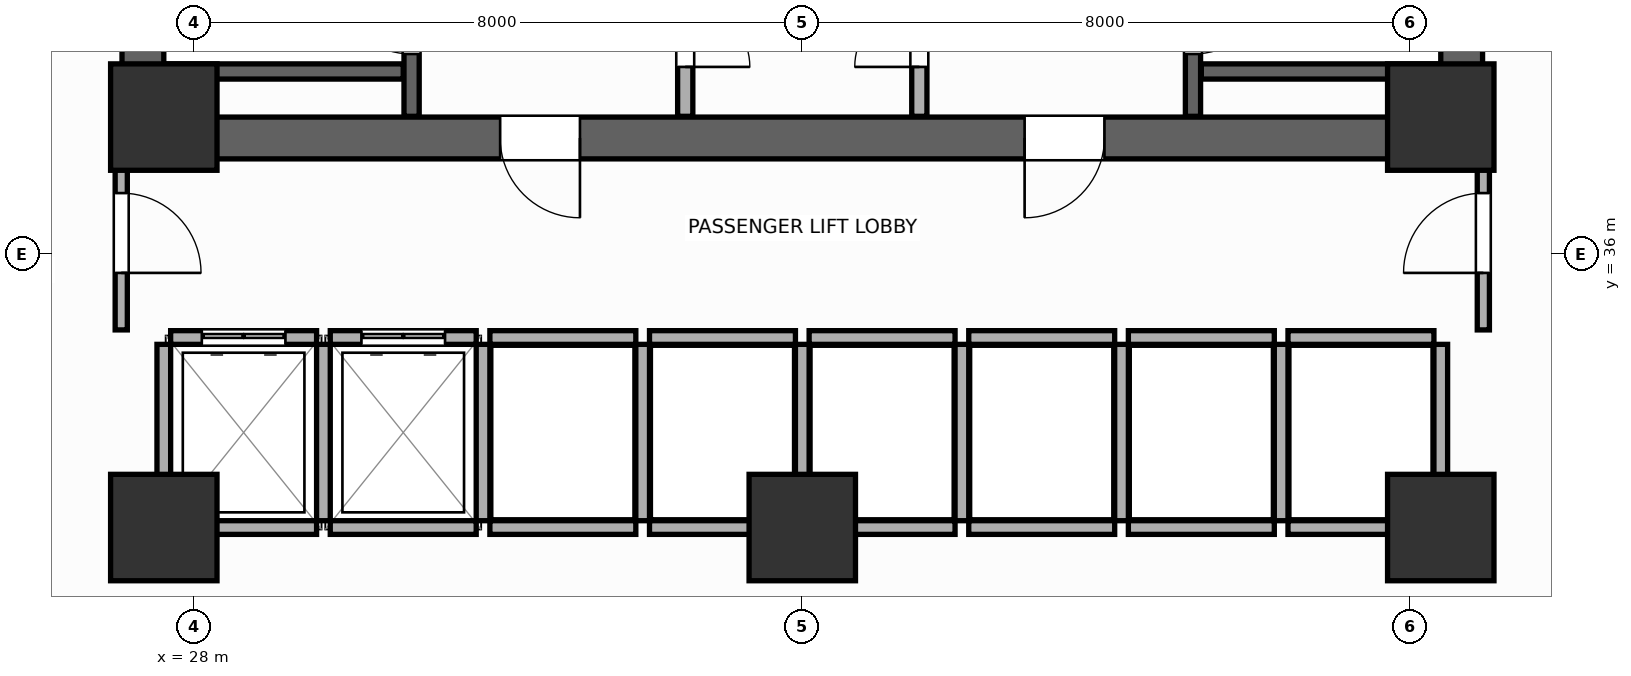
"""IFC4 building model, lengths in metres.
Left out: names, types, materials, properties, quantities, classifications, styles, units other than length and angle.
Written with IfcOpenShell. Run it as: python <this file> out.ifc"""

import sys

from ifc_helpers import new_model, si_unit, direction, frame, frame_2d, origin, origin_2d, place, context, subcontext, project, spatial, rectangle, extrude, source, transform, mapped, element, fill, save


model = new_model("IFC4")
c1 = context("Model", 3, precision=1e-05, world=origin(), true_north=direction((0.0, 1.0)))
c2 = subcontext(c1, "Body", "Model", "MODEL_VIEW")
j1 = project(units=[si_unit("LENGTHUNIT", "METRE"), si_unit("PLANEANGLEUNIT", "RADIAN")], contexts=[c1])
p1 = place(None, origin())
s1 = spatial("IfcSite", under=j1, at=p1, CompositionType="ELEMENT")
p2 = place(p1, origin())
s2 = spatial("IfcBuilding", under=s1, at=p2, CompositionType="ELEMENT")
p3 = place(p2, frame((0.0, 0.0, 75.6)))
s3 = spatial("IfcBuildingStorey", under=s2, at=p3, CompositionType="ELEMENT", Elevation=75.6)
p4 = place(p3, frame((27.05, 37.525, 0.0), z_axis=(0.0, 0.0, 1.0), x_axis=(1.0, 0.0, 0.0)))
e1 = element("IfcWall", 1, at=p4, inside=s3, PredefinedType="SHEAR", context=c2, shape_type="SweptSolid", body=[
    extrude(rectangle(XDim=17.9, YDim=0.55, at=frame_2d((8.95, 0.0))), origin(), (0.0, 0.0, 1.0), 3.9),
])
p5 = place(p4, frame((4.975, 0.0, 0.0)))
e2 = element("IfcOpeningElement", 2, at=p5, cuts=e1, PredefinedType="OPENING", context=c2, shape_type="SweptSolid", body=[
    extrude(rectangle(XDim=1.05, YDim=2.1, at=frame_2d((0.525, 1.05))), frame((0.0, 0.285, 0.0), z_axis=(0.0, -1.0, 0.0), x_axis=(1.0, 0.0, 0.0)), (0.0, 0.0, 1.0), 0.57),
])
p6 = place(p4, frame((11.875, 0.0, 0.0)))
e3 = element("IfcOpeningElement", 3, at=p6, cuts=e1, PredefinedType="OPENING", context=c2, shape_type="SweptSolid", body=[
    extrude(rectangle(XDim=1.05, YDim=2.1, at=frame_2d((0.525, 1.05))), frame((0.0, 0.285, 0.0), z_axis=(0.0, -1.0, 0.0), x_axis=(1.0, 0.0, 0.0)), (0.0, 0.0, 1.0), 0.57),
])
for number, where, z_axis, x_axis in (
    (4, (27.325, 37.8, 0.0), (0.0, 0.0, 1.0), (0.0, 1.0, 0.0)),
    (5, (44.675, 37.8, 0.0), (0.0, 0.0, 1.0), (0.0, 1.0, 0.0)),
):
    element("IfcWall", number, at=place(p3, frame(where, z_axis=z_axis, x_axis=x_axis)), inside=s3, PredefinedType="SHEAR", context=c2, shape_type="SweptSolid", body=[
        extrude(rectangle(XDim=9.0, YDim=0.55, at=frame_2d((4.5, 0.0))), origin(), (0.0, 0.0, 1.0), 3.9),
    ])
m1 = source(origin(), c2, "Body", "SweptSolid", [
    extrude(rectangle(XDim=1.4, YDim=1.4, at=origin_2d()), origin(), (0.0, 0.0, 1.0), 3.9),
])
for number, where, z_axis, x_axis in (
    (6, (27.6, 37.8, 0.0), (0.0, 0.0, 1.0), (1.0, 0.0, 0.0)),
    (7, (44.4, 37.8, 0.0), (0.0, 0.0, 1.0), (1.0, 0.0, 0.0)),
    (8, (27.6, 32.4, 0.0), (0.0, 0.0, 1.0), (1.0, 0.0, 0.0)),
    (9, (44.4, 32.4, 0.0), (0.0, 0.0, 1.0), (1.0, 0.0, 0.0)),
    (10, (36.0, 32.4, 0.0), (0.0, 0.0, 1.0), (1.0, 0.0, 0.0)),
):
    element("IfcColumn", number, at=place(p3, frame(where, z_axis=z_axis, x_axis=x_axis)), inside=s3, PredefinedType="COLUMN", context=c2, shape_type="MappedRepresentation", body=[
        mapped(m1, transform((0.0, 0.0, 0.0), scale=1.0)),
    ])
p7 = place(p3, frame((30.86, 37.81, 0.0), z_axis=(0.0, 0.0, 1.0), x_axis=(0.0, 1.0, 0.0)))
e11 = element("IfcWall", 11, at=p7, inside=s3, PredefinedType="SHEAR", context=c2, shape_type="SweptSolid", body=[
    extrude(rectangle(XDim=8.98, YDim=0.2, at=frame_2d((4.49, 0.0))), origin(), (0.0, 0.0, 1.0), 3.9),
])
p8 = place(p7, frame((0.82, 0.0, 0.0)))
e12 = element("IfcOpeningElement", 12, at=p8, cuts=e11, PredefinedType="OPENING", context=c2, shape_type="SweptSolid", body=[
    extrude(rectangle(XDim=1.05, YDim=2.1, at=frame_2d((0.525, 1.05))), frame((0.0, 0.11, 0.0), z_axis=(0.0, -1.0, 0.0), x_axis=(1.0, 0.0, 0.0)), (0.0, 0.0, 1.0), 0.22),
])
p9 = place(p3, frame((27.61, 38.4, 0.0), z_axis=(0.0, 0.0, 1.0), x_axis=(1.0, 0.0, 0.0)))
e13 = element("IfcWall", 13, at=p9, inside=s3, PredefinedType="SHEAR", context=c2, shape_type="SweptSolid", body=[
    extrude(rectangle(XDim=3.14, YDim=0.2, at=frame_2d((1.57, 0.0))), origin(), (0.0, 0.0, 1.0), 3.9),
])
p10 = place(p3, frame((41.14, 37.81, 0.0), z_axis=(0.0, 0.0, 1.0), x_axis=(0.0, 1.0, 0.0)))
e14 = element("IfcWall", 14, at=p10, inside=s3, PredefinedType="SHEAR", context=c2, shape_type="SweptSolid", body=[
    extrude(rectangle(XDim=8.98, YDim=0.2, at=frame_2d((4.49, 0.0))), origin(), (0.0, 0.0, 1.0), 3.9),
])
p11 = place(p10, frame((0.82, 0.0, 0.0)))
e15 = element("IfcOpeningElement", 15, at=p11, cuts=e14, PredefinedType="OPENING", context=c2, shape_type="SweptSolid", body=[
    extrude(rectangle(XDim=1.05, YDim=2.1, at=frame_2d((0.525, 1.05))), frame((0.0, 0.11, 0.0), z_axis=(0.0, -1.0, 0.0), x_axis=(1.0, 0.0, 0.0)), (0.0, 0.0, 1.0), 0.22),
])
p12 = place(p3, frame((41.25, 38.4, 0.0), z_axis=(0.0, 0.0, 1.0), x_axis=(1.0, 0.0, 0.0)))
e16 = element("IfcWall", 16, at=p12, inside=s3, PredefinedType="SHEAR", context=c2, shape_type="SweptSolid", body=[
    extrude(rectangle(XDim=3.14, YDim=0.2, at=frame_2d((1.57, 0.0))), origin(), (0.0, 0.0, 1.0), 3.9),
])
p13 = place(p3, frame((34.46, 37.81, 0.0), z_axis=(0.0, 0.0, 1.0), x_axis=(0.0, 1.0, 0.0)))
e17 = element("IfcWall", 17, at=p13, inside=s3, PredefinedType="PARTITIONING", context=c2, shape_type="SweptSolid", body=[
    extrude(rectangle(XDim=8.98, YDim=0.2, at=frame_2d((4.49, 0.0))), origin(), (0.0, 0.0, 1.0), 3.68),
])
p14 = place(p13, frame((0.65, 0.0, 0.0)))
e18 = element("IfcOpeningElement", 18, at=p14, cuts=e17, PredefinedType="OPENING", context=c2, shape_type="SweptSolid", body=[
    extrude(rectangle(XDim=0.85, YDim=2.05, at=frame_2d((0.425, 1.025))), frame((0.0, 0.11, 0.0), z_axis=(0.0, -1.0, 0.0), x_axis=(1.0, 0.0, 0.0)), (0.0, 0.0, 1.0), 0.22),
])
p15 = place(p3, frame((37.54, 37.81, 0.0), z_axis=(0.0, 0.0, 1.0), x_axis=(0.0, 1.0, 0.0)))
e19 = element("IfcWall", 19, at=p15, inside=s3, PredefinedType="PARTITIONING", context=c2, shape_type="SweptSolid", body=[
    extrude(rectangle(XDim=8.98, YDim=0.2, at=frame_2d((4.49, 0.0))), origin(), (0.0, 0.0, 1.0), 3.68),
])
p16 = place(p15, frame((0.65, 0.0, 0.0)))
e20 = element("IfcOpeningElement", 20, at=p16, cuts=e19, PredefinedType="OPENING", context=c2, shape_type="SweptSolid", body=[
    extrude(rectangle(XDim=0.85, YDim=2.05, at=frame_2d((0.425, 1.025))), frame((0.0, 0.11, 0.0), z_axis=(0.0, -1.0, 0.0), x_axis=(1.0, 0.0, 0.0)), (0.0, 0.0, 1.0), 0.22),
])
p17 = place(p3, frame((27.69, 34.9, 0.0), z_axis=(0.0, 0.0, 1.0), x_axis=(1.0, 0.0, 0.0)))
e21 = element("IfcWall", 21, at=p17, inside=s3, PredefinedType="PARTITIONING", context=c2, shape_type="SweptSolid", body=[
    extrude(rectangle(XDim=1.92, YDim=0.18, at=frame_2d((0.96, 0.0))), origin(), (0.0, 0.0, 1.0), 3.68),
])
p18 = place(p17, frame((0.41, 0.0, 0.0)))
e22 = element("IfcOpeningElement", 22, at=p18, cuts=e21, PredefinedType="OPENING", context=c2, shape_type="SweptSolid", body=[
    extrude(rectangle(XDim=1.1, YDim=2.1, at=frame_2d((0.55, 1.05))), frame((0.0, 0.1, 0.0), z_axis=(0.0, -1.0, 0.0), x_axis=(1.0, 0.0, 0.0)), (0.0, 0.0, 1.0), 0.2),
])
p19 = place(p3, frame((27.69, 32.4, 0.0), z_axis=(0.0, 0.0, 1.0), x_axis=(1.0, 0.0, 0.0)))
e23 = element("IfcWall", 23, at=p19, inside=s3, PredefinedType="PARTITIONING", context=c2, shape_type="SweptSolid", body=[
    extrude(rectangle(XDim=1.92, YDim=0.18, at=frame_2d((0.96, 0.0))), origin(), (0.0, 0.0, 1.0), 3.18),
])
p20 = place(p3, frame((27.6, 32.49, 0.0), z_axis=(0.0, 0.0, 1.0), x_axis=(0.0, 1.0, 0.0)))
e24 = element("IfcWall", 24, at=p20, inside=s3, PredefinedType="PARTITIONING", context=c2, shape_type="SweptSolid", body=[
    extrude(rectangle(XDim=2.32, YDim=0.18, at=frame_2d((1.16, 0.0))), origin(), (0.0, 0.0, 1.0), 3.68),
])
p21 = place(p3, frame((29.79, 34.9, 0.0), z_axis=(0.0, 0.0, 1.0), x_axis=(1.0, 0.0, 0.0)))
e25 = element("IfcWall", 25, at=p21, inside=s3, PredefinedType="PARTITIONING", context=c2, shape_type="SweptSolid", body=[
    extrude(rectangle(XDim=1.92, YDim=0.18, at=frame_2d((0.96, 0.0))), origin(), (0.0, 0.0, 1.0), 3.68),
])
p22 = place(p21, frame((0.41, 0.0, 0.0)))
e26 = element("IfcOpeningElement", 26, at=p22, cuts=e25, PredefinedType="OPENING", context=c2, shape_type="SweptSolid", body=[
    extrude(rectangle(XDim=1.1, YDim=2.1, at=frame_2d((0.55, 1.05))), frame((0.0, 0.1, 0.0), z_axis=(0.0, -1.0, 0.0), x_axis=(1.0, 0.0, 0.0)), (0.0, 0.0, 1.0), 0.2),
])
p23 = place(p3, frame((29.79, 32.4, 0.0), z_axis=(0.0, 0.0, 1.0), x_axis=(1.0, 0.0, 0.0)))
e27 = element("IfcWall", 27, at=p23, inside=s3, PredefinedType="PARTITIONING", context=c2, shape_type="SweptSolid", body=[
    extrude(rectangle(XDim=1.92, YDim=0.18, at=frame_2d((0.96, 0.0))), origin(), (0.0, 0.0, 1.0), 3.18),
])
p24 = place(p3, frame((29.7, 32.49, 0.0), z_axis=(0.0, 0.0, 1.0), x_axis=(0.0, 1.0, 0.0)))
e28 = element("IfcWall", 28, at=p24, inside=s3, PredefinedType="PARTITIONING", context=c2, shape_type="SweptSolid", body=[
    extrude(rectangle(XDim=2.32, YDim=0.18, at=frame_2d((1.16, 0.0))), origin(), (0.0, 0.0, 1.0), 3.68),
])
p25 = place(p3, frame((31.89, 34.9, 0.0), z_axis=(0.0, 0.0, 1.0), x_axis=(1.0, 0.0, 0.0)))
e29 = element("IfcWall", 29, at=p25, inside=s3, PredefinedType="PARTITIONING", context=c2, shape_type="SweptSolid", body=[
    extrude(rectangle(XDim=1.92, YDim=0.18, at=frame_2d((0.96, 0.0))), origin(), (0.0, 0.0, 1.0), 3.68),
])
p26 = place(p3, frame((31.89, 32.4, 0.0), z_axis=(0.0, 0.0, 1.0), x_axis=(1.0, 0.0, 0.0)))
e30 = element("IfcWall", 30, at=p26, inside=s3, PredefinedType="PARTITIONING", context=c2, shape_type="SweptSolid", body=[
    extrude(rectangle(XDim=1.92, YDim=0.18, at=frame_2d((0.96, 0.0))), origin(), (0.0, 0.0, 1.0), 3.18),
])
p27 = place(p3, frame((31.8, 32.49, 0.0), z_axis=(0.0, 0.0, 1.0), x_axis=(0.0, 1.0, 0.0)))
e31 = element("IfcWall", 31, at=p27, inside=s3, PredefinedType="PARTITIONING", context=c2, shape_type="SweptSolid", body=[
    extrude(rectangle(XDim=2.32, YDim=0.18, at=frame_2d((1.16, 0.0))), origin(), (0.0, 0.0, 1.0), 3.68),
])
p28 = place(p3, frame((33.99, 34.9, 0.0), z_axis=(0.0, 0.0, 1.0), x_axis=(1.0, 0.0, 0.0)))
e32 = element("IfcWall", 32, at=p28, inside=s3, PredefinedType="PARTITIONING", context=c2, shape_type="SweptSolid", body=[
    extrude(rectangle(XDim=1.92, YDim=0.18, at=frame_2d((0.96, 0.0))), origin(), (0.0, 0.0, 1.0), 3.68),
])
p29 = place(p3, frame((33.99, 32.4, 0.0), z_axis=(0.0, 0.0, 1.0), x_axis=(1.0, 0.0, 0.0)))
e33 = element("IfcWall", 33, at=p29, inside=s3, PredefinedType="PARTITIONING", context=c2, shape_type="SweptSolid", body=[
    extrude(rectangle(XDim=1.92, YDim=0.18, at=frame_2d((0.96, 0.0))), origin(), (0.0, 0.0, 1.0), 3.18),
])
p30 = place(p3, frame((33.9, 32.49, 0.0), z_axis=(0.0, 0.0, 1.0), x_axis=(0.0, 1.0, 0.0)))
e34 = element("IfcWall", 34, at=p30, inside=s3, PredefinedType="PARTITIONING", context=c2, shape_type="SweptSolid", body=[
    extrude(rectangle(XDim=2.32, YDim=0.18, at=frame_2d((1.16, 0.0))), origin(), (0.0, 0.0, 1.0), 3.68),
])
p31 = place(p3, frame((36.09, 34.9, 0.0), z_axis=(0.0, 0.0, 1.0), x_axis=(1.0, 0.0, 0.0)))
e35 = element("IfcWall", 35, at=p31, inside=s3, PredefinedType="PARTITIONING", context=c2, shape_type="SweptSolid", body=[
    extrude(rectangle(XDim=1.92, YDim=0.18, at=frame_2d((0.96, 0.0))), origin(), (0.0, 0.0, 1.0), 3.68),
])
p32 = place(p3, frame((36.09, 32.4, 0.0), z_axis=(0.0, 0.0, 1.0), x_axis=(1.0, 0.0, 0.0)))
e36 = element("IfcWall", 36, at=p32, inside=s3, PredefinedType="PARTITIONING", context=c2, shape_type="SweptSolid", body=[
    extrude(rectangle(XDim=1.92, YDim=0.18, at=frame_2d((0.96, 0.0))), origin(), (0.0, 0.0, 1.0), 3.18),
])
p33 = place(p3, frame((36.0, 32.49, 0.0), z_axis=(0.0, 0.0, 1.0), x_axis=(0.0, 1.0, 0.0)))
e37 = element("IfcWall", 37, at=p33, inside=s3, PredefinedType="PARTITIONING", context=c2, shape_type="SweptSolid", body=[
    extrude(rectangle(XDim=2.32, YDim=0.18, at=frame_2d((1.16, 0.0))), origin(), (0.0, 0.0, 1.0), 3.68),
])
p34 = place(p3, frame((38.19, 34.9, 0.0), z_axis=(0.0, 0.0, 1.0), x_axis=(1.0, 0.0, 0.0)))
e38 = element("IfcWall", 38, at=p34, inside=s3, PredefinedType="PARTITIONING", context=c2, shape_type="SweptSolid", body=[
    extrude(rectangle(XDim=1.92, YDim=0.18, at=frame_2d((0.96, 0.0))), origin(), (0.0, 0.0, 1.0), 3.68),
])
p35 = place(p3, frame((38.19, 32.4, 0.0), z_axis=(0.0, 0.0, 1.0), x_axis=(1.0, 0.0, 0.0)))
e39 = element("IfcWall", 39, at=p35, inside=s3, PredefinedType="PARTITIONING", context=c2, shape_type="SweptSolid", body=[
    extrude(rectangle(XDim=1.92, YDim=0.18, at=frame_2d((0.96, 0.0))), origin(), (0.0, 0.0, 1.0), 3.18),
])
p36 = place(p3, frame((38.1, 32.49, 0.0), z_axis=(0.0, 0.0, 1.0), x_axis=(0.0, 1.0, 0.0)))
e40 = element("IfcWall", 40, at=p36, inside=s3, PredefinedType="PARTITIONING", context=c2, shape_type="SweptSolid", body=[
    extrude(rectangle(XDim=2.32, YDim=0.18, at=frame_2d((1.16, 0.0))), origin(), (0.0, 0.0, 1.0), 3.68),
])
p37 = place(p3, frame((40.29, 34.9, 0.0), z_axis=(0.0, 0.0, 1.0), x_axis=(1.0, 0.0, 0.0)))
e41 = element("IfcWall", 41, at=p37, inside=s3, PredefinedType="PARTITIONING", context=c2, shape_type="SweptSolid", body=[
    extrude(rectangle(XDim=1.92, YDim=0.18, at=frame_2d((0.96, 0.0))), origin(), (0.0, 0.0, 1.0), 3.68),
])
p38 = place(p3, frame((40.29, 32.4, 0.0), z_axis=(0.0, 0.0, 1.0), x_axis=(1.0, 0.0, 0.0)))
e42 = element("IfcWall", 42, at=p38, inside=s3, PredefinedType="PARTITIONING", context=c2, shape_type="SweptSolid", body=[
    extrude(rectangle(XDim=1.92, YDim=0.18, at=frame_2d((0.96, 0.0))), origin(), (0.0, 0.0, 1.0), 3.18),
])
p39 = place(p3, frame((40.2, 32.49, 0.0), z_axis=(0.0, 0.0, 1.0), x_axis=(0.0, 1.0, 0.0)))
e43 = element("IfcWall", 43, at=p39, inside=s3, PredefinedType="PARTITIONING", context=c2, shape_type="SweptSolid", body=[
    extrude(rectangle(XDim=2.32, YDim=0.18, at=frame_2d((1.16, 0.0))), origin(), (0.0, 0.0, 1.0), 3.68),
])
p40 = place(p3, frame((42.39, 34.9, 0.0), z_axis=(0.0, 0.0, 1.0), x_axis=(1.0, 0.0, 0.0)))
e44 = element("IfcWall", 44, at=p40, inside=s3, PredefinedType="PARTITIONING", context=c2, shape_type="SweptSolid", body=[
    extrude(rectangle(XDim=1.92, YDim=0.18, at=frame_2d((0.96, 0.0))), origin(), (0.0, 0.0, 1.0), 3.68),
])
p41 = place(p3, frame((42.39, 32.4, 0.0), z_axis=(0.0, 0.0, 1.0), x_axis=(1.0, 0.0, 0.0)))
e45 = element("IfcWall", 45, at=p41, inside=s3, PredefinedType="PARTITIONING", context=c2, shape_type="SweptSolid", body=[
    extrude(rectangle(XDim=1.92, YDim=0.18, at=frame_2d((0.96, 0.0))), origin(), (0.0, 0.0, 1.0), 3.18),
])
for number, where, z_axis, x_axis in (
    (46, (42.3, 32.49, 0.0), (0.0, 0.0, 1.0), (0.0, 1.0, 0.0)),
    (47, (44.4, 32.49, 0.0), (0.0, 0.0, 1.0), (0.0, 1.0, 0.0)),
):
    element("IfcWall", number, at=place(p3, frame(where, z_axis=z_axis, x_axis=x_axis)), inside=s3, PredefinedType="PARTITIONING", context=c2, shape_type="SweptSolid", body=[
        extrude(rectangle(XDim=2.32, YDim=0.18, at=frame_2d((1.16, 0.0))), origin(), (0.0, 0.0, 1.0), 3.68),
    ])
p42 = place(p3, frame((27.04, 35.0, 0.0), z_axis=(0.0, 0.0, 1.0), x_axis=(0.0, 1.0, 0.0)))
e48 = element("IfcWall", 48, at=p42, inside=s3, PredefinedType="PARTITIONING", context=c2, shape_type="SweptSolid", body=[
    extrude(rectangle(XDim=2.65, YDim=0.16, at=frame_2d((1.325, 0.0))), origin(), (0.0, 0.0, 1.0), 3.68),
])
p43 = place(p42, frame((0.75, 0.0, 0.0)))
e49 = element("IfcOpeningElement", 49, at=p43, cuts=e48, PredefinedType="OPENING", context=c2, shape_type="SweptSolid", body=[
    extrude(rectangle(XDim=1.05, YDim=2.1, at=frame_2d((0.525, 1.05))), frame((0.0, 0.09, 0.0), z_axis=(0.0, -1.0, 0.0), x_axis=(1.0, 0.0, 0.0)), (0.0, 0.0, 1.0), 0.18),
])
p44 = place(p3, frame((44.96, 35.0, 0.0), z_axis=(0.0, 0.0, 1.0), x_axis=(0.0, 1.0, 0.0)))
e50 = element("IfcWall", 50, at=p44, inside=s3, PredefinedType="PARTITIONING", context=c2, shape_type="SweptSolid", body=[
    extrude(rectangle(XDim=2.65, YDim=0.16, at=frame_2d((1.325, 0.0))), origin(), (0.0, 0.0, 1.0), 3.68),
])
p45 = place(p44, frame((0.75, 0.0, 0.0)))
e51 = element("IfcOpeningElement", 51, at=p45, cuts=e50, PredefinedType="OPENING", context=c2, shape_type="SweptSolid", body=[
    extrude(rectangle(XDim=1.05, YDim=2.1, at=frame_2d((0.525, 1.05))), frame((0.0, 0.09, 0.0), z_axis=(0.0, -1.0, 0.0), x_axis=(1.0, 0.0, 0.0)), (0.0, 0.0, 1.0), 0.18),
])
p46 = place(p8, origin())
e52 = element("IfcDoor", 52, at=p46, inside=s3, OperationType="SINGLE_SWING_RIGHT", PredefinedType="DOOR", context=c2, shape_type="SweptSolid", body=[
    extrude(rectangle(XDim=1.05, YDim=2.1, at=frame_2d((0.525, 1.05))), frame((0.0, 0.025, 0.0), z_axis=(0.0, -1.0, 0.0), x_axis=(1.0, 0.0, 0.0)), (0.0, 0.0, 1.0), 0.05),
])
fill(e12, e52)
p47 = place(p11, frame((1.05, 0.0, 0.0), z_axis=(0.0, 0.0, 1.0), x_axis=(-1.0, 0.0, 0.0)))
e53 = element("IfcDoor", 53, at=p47, inside=s3, OperationType="SINGLE_SWING_LEFT", PredefinedType="DOOR", context=c2, shape_type="SweptSolid", body=[
    extrude(rectangle(XDim=1.05, YDim=2.1, at=frame_2d((0.525, 1.05))), frame((0.0, 0.025, 0.0), z_axis=(0.0, -1.0, 0.0), x_axis=(1.0, 0.0, 0.0)), (0.0, 0.0, 1.0), 0.05),
])
fill(e15, e53)
p48 = place(p14, frame((0.85, 0.0, 0.0), z_axis=(0.0, 0.0, 1.0), x_axis=(-1.0, 0.0, 0.0)))
e54 = element("IfcDoor", 54, at=p48, inside=s3, OperationType="SINGLE_SWING_RIGHT", PredefinedType="DOOR", context=c2, shape_type="SweptSolid", body=[
    extrude(rectangle(XDim=0.85, YDim=2.05, at=frame_2d((0.425, 1.025))), frame((0.0, 0.025, 0.0), z_axis=(0.0, -1.0, 0.0), x_axis=(1.0, 0.0, 0.0)), (0.0, 0.0, 1.0), 0.05),
])
fill(e18, e54)
p49 = place(p16, origin())
e55 = element("IfcDoor", 55, at=p49, inside=s3, OperationType="SINGLE_SWING_LEFT", PredefinedType="DOOR", context=c2, shape_type="SweptSolid", body=[
    extrude(rectangle(XDim=0.85, YDim=2.05, at=frame_2d((0.425, 1.025))), frame((0.0, 0.025, 0.0), z_axis=(0.0, -1.0, 0.0), x_axis=(1.0, 0.0, 0.0)), (0.0, 0.0, 1.0), 0.05),
])
fill(e20, e55)
p50 = place(p18, origin())
e56 = element("IfcDoor", 56, at=p50, inside=s3, OperationType="DOUBLE_DOOR_SLIDING", PredefinedType="DOOR", context=c2, shape_type="SweptSolid", body=[
    extrude(rectangle(XDim=1.1, YDim=2.1, at=frame_2d((0.55, 1.05))), frame((0.0, 0.025, 0.0), z_axis=(0.0, -1.0, 0.0), x_axis=(1.0, 0.0, 0.0)), (0.0, 0.0, 1.0), 0.05),
])
fill(e22, e56)
p51 = place(p22, origin())
e57 = element("IfcDoor", 57, at=p51, inside=s3, OperationType="DOUBLE_DOOR_SLIDING", PredefinedType="DOOR", context=c2, shape_type="SweptSolid", body=[
    extrude(rectangle(XDim=1.1, YDim=2.1, at=frame_2d((0.55, 1.05))), frame((0.0, 0.025, 0.0), z_axis=(0.0, -1.0, 0.0), x_axis=(1.0, 0.0, 0.0)), (0.0, 0.0, 1.0), 0.05),
])
fill(e26, e57)
p52 = place(p43, frame((1.05, 0.0, 0.0), z_axis=(0.0, 0.0, 1.0), x_axis=(-1.0, 0.0, 0.0)))
e58 = element("IfcDoor", 58, at=p52, inside=s3, OperationType="SINGLE_SWING_RIGHT", PredefinedType="DOOR", context=c2, shape_type="SweptSolid", body=[
    extrude(rectangle(XDim=1.05, YDim=2.1, at=frame_2d((0.525, 1.05))), frame((0.0, 0.025, 0.0), z_axis=(0.0, -1.0, 0.0), x_axis=(1.0, 0.0, 0.0)), (0.0, 0.0, 1.0), 0.05),
])
fill(e49, e58)
p53 = place(p45, origin())
e59 = element("IfcDoor", 59, at=p53, inside=s3, OperationType="SINGLE_SWING_LEFT", PredefinedType="DOOR", context=c2, shape_type="SweptSolid", body=[
    extrude(rectangle(XDim=1.05, YDim=2.1, at=frame_2d((0.525, 1.05))), frame((0.0, 0.025, 0.0), z_axis=(0.0, -1.0, 0.0), x_axis=(1.0, 0.0, 0.0)), (0.0, 0.0, 1.0), 0.05),
])
fill(e51, e59)
p54 = place(p5, frame((1.05, 0.0, 0.0), z_axis=(0.0, 0.0, 1.0), x_axis=(-1.0, 0.0, 0.0)))
e60 = element("IfcDoor", 60, at=p54, inside=s3, OperationType="SINGLE_SWING_LEFT", PredefinedType="DOOR", context=c2, shape_type="SweptSolid", body=[
    extrude(rectangle(XDim=1.05, YDim=2.1, at=frame_2d((0.525, 1.05))), frame((0.0, 0.025, 0.0), z_axis=(0.0, -1.0, 0.0), x_axis=(1.0, 0.0, 0.0)), (0.0, 0.0, 1.0), 0.05),
])
fill(e2, e60)
p55 = place(p6, frame((1.05, 0.0, 0.0), z_axis=(0.0, 0.0, 1.0), x_axis=(-1.0, 0.0, 0.0)))
e61 = element("IfcDoor", 61, at=p55, inside=s3, OperationType="SINGLE_SWING_RIGHT", PredefinedType="DOOR", context=c2, shape_type="SweptSolid", body=[
    extrude(rectangle(XDim=1.05, YDim=2.1, at=frame_2d((0.525, 1.05))), frame((0.0, 0.025, 0.0), z_axis=(0.0, -1.0, 0.0), x_axis=(1.0, 0.0, 0.0)), (0.0, 0.0, 1.0), 0.05),
])
fill(e3, e61)
save(model, sys.argv[1])
